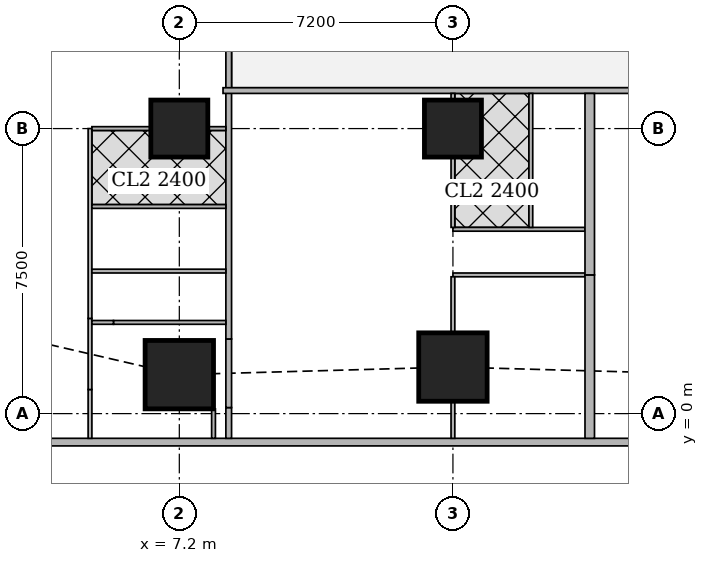
"""IFC4 building model, lengths in metres.
Left out: names, types, materials, properties, quantities, classifications, styles, units other than length and angle.
Written with IfcOpenShell. Run it as: python <this file> out.ifc"""

import sys

from ifc_helpers import new_model, si_unit, direction, frame, frame_2d, origin, origin_2d, place, context, subcontext, project, spatial, rectangle, extrude, element, fill, save


model = new_model("IFC4")
c1 = context("Model", 3, precision=1e-05, world=origin(), true_north=direction((0.0, 1.0)))
c2 = subcontext(c1, "Body", "Model", "MODEL_VIEW")
j1 = project(units=[si_unit("LENGTHUNIT", "METRE"), si_unit("PLANEANGLEUNIT", "RADIAN")], contexts=[c1])
p1 = place(None, origin())
s1 = spatial("IfcSite", under=j1, at=p1, CompositionType="ELEMENT")
p2 = place(p1, origin())
s2 = spatial("IfcBuilding", under=s1, at=p2, CompositionType="ELEMENT")
p3 = place(p2, frame((0.0, 0.0, 139.55)))
s3 = spatial("IfcBuildingStorey", under=s2, at=p3, CompositionType="ELEMENT", Elevation=139.55)
for number, where, z_axis, x_axis in (
    (1, (7.2, 1.025, 0.0), (0.0, 0.0, 1.0), (1.0, 0.0, 0.0)),
    (2, (14.4, 1.225, 0.0), (0.0, 0.0, 1.0), (1.0, 0.0, 0.0)),
):
    element("IfcColumn", number, at=place(p3, frame(where, z_axis=z_axis, x_axis=x_axis)), inside=s3, PredefinedType="COLUMN", context=c2, shape_type="SweptSolid", body=[
        extrude(rectangle(XDim=1.8, YDim=1.8, at=origin_2d()), origin(), (0.0, 0.0, 1.0), 3.75),
    ])
for number, where, z_axis, x_axis in (
    (3, (7.2, 7.5, 0.0), (0.0, 0.0, 1.0), (1.0, 0.0, 0.0)),
    (4, (14.4, 7.5, 0.0), (0.0, 0.0, 1.0), (1.0, 0.0, 0.0)),
):
    element("IfcColumn", number, at=place(p3, frame(where, z_axis=z_axis, x_axis=x_axis)), inside=s3, PredefinedType="COLUMN", context=c2, shape_type="SweptSolid", body=[
        extrude(rectangle(XDim=1.5, YDim=1.5, at=origin_2d()), origin(), (0.0, 0.0, 1.0), 3.75),
    ])
p4 = place(p3, frame((2.163, -0.75, 0.0), z_axis=(0.0, 0.0, 1.0), x_axis=(1.0, 0.0, 0.0)))
e5 = element("IfcWall", 5, at=p4, inside=s3, PredefinedType="SOLIDWALL", context=c2, shape_type="SweptSolid", body=[
    extrude(rectangle(XDim=45.628, YDim=0.2, at=frame_2d((22.814, 0.0))), origin(), (0.0, 0.0, 1.0), 3.5),
])
p5 = place(p4, frame((9.537, 0.0, 0.9)))
e6 = element("IfcOpeningElement", 6, at=p5, cuts=e5, PredefinedType="OPENING", context=c2, shape_type="SweptSolid", body=[
    extrude(rectangle(XDim=1.8, YDim=1.5, at=frame_2d((0.9, 0.75))), frame((0.0, 0.11, 0.0), z_axis=(0.0, -1.0, 0.0), x_axis=(1.0, 0.0, 0.0)), (0.0, 0.0, 1.0), 0.22),
])
p6 = place(p4, frame((13.137, 0.0, 0.9)))
e7 = element("IfcOpeningElement", 7, at=p6, cuts=e5, PredefinedType="OPENING", context=c2, shape_type="SweptSolid", body=[
    extrude(rectangle(XDim=1.8, YDim=1.5, at=frame_2d((0.9, 0.75))), frame((0.0, 0.11, 0.0), z_axis=(0.0, -1.0, 0.0), x_axis=(1.0, 0.0, 0.0)), (0.0, 0.0, 1.0), 0.22),
])
p7 = place(p4, frame((16.737, 0.0, 0.9)))
e8 = element("IfcOpeningElement", 8, at=p7, cuts=e5, PredefinedType="OPENING", context=c2, shape_type="SweptSolid", body=[
    extrude(rectangle(XDim=1.8, YDim=1.5, at=frame_2d((0.9, 0.75))), frame((0.0, 0.11, 0.0), z_axis=(0.0, -1.0, 0.0), x_axis=(1.0, 0.0, 0.0)), (0.0, 0.0, 1.0), 0.22),
])
p8 = place(p4, frame((20.337, 0.0, 0.9)))
e9 = element("IfcOpeningElement", 9, at=p8, cuts=e5, PredefinedType="OPENING", context=c2, shape_type="SweptSolid", body=[
    extrude(rectangle(XDim=1.8, YDim=1.5, at=frame_2d((0.9, 0.75))), frame((0.0, 0.11, 0.0), z_axis=(0.0, -1.0, 0.0), x_axis=(1.0, 0.0, 0.0)), (0.0, 0.0, 1.0), 0.22),
])
p9 = place(p4, frame((23.937, 0.0, 0.9)))
e10 = element("IfcOpeningElement", 10, at=p9, cuts=e5, PredefinedType="OPENING", context=c2, shape_type="SweptSolid", body=[
    extrude(rectangle(XDim=1.8, YDim=1.5, at=frame_2d((0.9, 0.75))), frame((0.0, 0.11, 0.0), z_axis=(0.0, -1.0, 0.0), x_axis=(1.0, 0.0, 0.0)), (0.0, 0.0, 1.0), 0.22),
])
p10 = place(p4, frame((27.537, 0.0, 0.9)))
e11 = element("IfcOpeningElement", 11, at=p10, cuts=e5, PredefinedType="OPENING", context=c2, shape_type="SweptSolid", body=[
    extrude(rectangle(XDim=1.8, YDim=1.5, at=frame_2d((0.9, 0.75))), frame((0.0, 0.11, 0.0), z_axis=(0.0, -1.0, 0.0), x_axis=(1.0, 0.0, 0.0)), (0.0, 0.0, 1.0), 0.22),
])
p11 = place(p4, frame((31.137, 0.0, 0.9)))
e12 = element("IfcOpeningElement", 12, at=p11, cuts=e5, PredefinedType="OPENING", context=c2, shape_type="SweptSolid", body=[
    extrude(rectangle(XDim=1.8, YDim=1.5, at=frame_2d((0.9, 0.75))), frame((0.0, 0.11, 0.0), z_axis=(0.0, -1.0, 0.0), x_axis=(1.0, 0.0, 0.0)), (0.0, 0.0, 1.0), 0.22),
])
p12 = place(p4, frame((34.737, 0.0, 0.9)))
e13 = element("IfcOpeningElement", 13, at=p12, cuts=e5, PredefinedType="OPENING", context=c2, shape_type="SweptSolid", body=[
    extrude(rectangle(XDim=1.8, YDim=1.5, at=frame_2d((0.9, 0.75))), frame((0.0, 0.11, 0.0), z_axis=(0.0, -1.0, 0.0), x_axis=(1.0, 0.0, 0.0)), (0.0, 0.0, 1.0), 0.22),
])
p13 = place(p3, frame((8.5, -0.65, 0.0), z_axis=(0.0, 0.0, 1.0), x_axis=(0.0, 1.0, 0.0)))
e14 = element("IfcWall", 14, at=p13, inside=s3, PredefinedType="SOLIDWALL", context=c2, shape_type="SweptSolid", body=[
    extrude(rectangle(XDim=0.809, YDim=0.15, at=frame_2d((0.404, 0.0))), origin(), (0.0, 0.0, 1.0), 3.5),
])
p14 = place(p3, frame((8.5, 0.159, 0.0), z_axis=(0.0, 0.0, 1.0), x_axis=(0.0, 1.0, 0.0)))
e15 = element("IfcWall", 15, at=p14, inside=s3, PredefinedType="SOLIDWALL", context=c2, shape_type="SweptSolid", body=[
    extrude(rectangle(XDim=1.805, YDim=0.15, at=frame_2d((0.903, 0.0))), origin(), (0.0, 0.0, 1.0), 2.1),
])
p15 = place(p3, frame((8.5, 1.964, 0.0), z_axis=(0.0, 0.0, 1.0), x_axis=(0.0, 1.0, 0.0)))
e16 = element("IfcWall", 16, at=p15, inside=s3, PredefinedType="SOLIDWALL", context=c2, shape_type="SweptSolid", body=[
    extrude(rectangle(XDim=41.097, YDim=0.15, at=frame_2d((20.548, 0.0))), origin(), (0.0, 0.0, 1.0), 3.5),
])
p16 = place(p15, frame((6.911, 0.0, 0.0)))
e17 = element("IfcOpeningElement", 17, at=p16, cuts=e16, PredefinedType="OPENING", context=c2, shape_type="SweptSolid", body=[
    extrude(rectangle(XDim=1.0, YDim=2.1, at=frame_2d((0.5, 1.05))), frame((0.0, 0.085, 0.0), z_axis=(0.0, -1.0, 0.0), x_axis=(1.0, 0.0, 0.0)), (0.0, 0.0, 1.0), 0.17),
])
p17 = place(p15, frame((10.661, 0.0, 0.0)))
e18 = element("IfcOpeningElement", 18, at=p17, cuts=e16, PredefinedType="OPENING", context=c2, shape_type="SweptSolid", body=[
    extrude(rectangle(XDim=1.0, YDim=2.1, at=frame_2d((0.5, 1.05))), frame((0.0, 0.085, 0.0), z_axis=(0.0, -1.0, 0.0), x_axis=(1.0, 0.0, 0.0)), (0.0, 0.0, 1.0), 0.17),
])
p18 = place(p15, frame((25.661, 0.0, 0.0)))
e19 = element("IfcOpeningElement", 19, at=p18, cuts=e16, PredefinedType="OPENING", context=c2, shape_type="SweptSolid", body=[
    extrude(rectangle(XDim=1.0, YDim=2.1, at=frame_2d((0.5, 1.05))), frame((0.0, 0.085, 0.0), z_axis=(0.0, -1.0, 0.0), x_axis=(1.0, 0.0, 0.0)), (0.0, 0.0, 1.0), 0.17),
])
p19 = place(p15, frame((33.161, 0.0, 0.0)))
e20 = element("IfcOpeningElement", 20, at=p19, cuts=e16, PredefinedType="OPENING", context=c2, shape_type="SweptSolid", body=[
    extrude(rectangle(XDim=1.0, YDim=2.1, at=frame_2d((0.5, 1.05))), frame((0.0, 0.085, 0.0), z_axis=(0.0, -1.0, 0.0), x_axis=(1.0, 0.0, 0.0)), (0.0, 0.0, 1.0), 0.17),
])
p20 = place(p3, frame((40.053, 8.5, 0.0), z_axis=(0.0, 0.0, 1.0), x_axis=(-1.0, 0.0, 0.0)))
e21 = element("IfcWall", 21, at=p20, inside=s3, PredefinedType="SOLIDWALL", context=c2, shape_type="SweptSolid", body=[
    extrude(rectangle(XDim=31.703, YDim=0.15, at=frame_2d((15.852, 0.0))), origin(), (0.0, 0.0, 1.0), 3.5),
])
p21 = place(p20, frame((28.103, 0.0, 0.0)))
e22 = element("IfcOpeningElement", 22, at=p21, cuts=e21, PredefinedType="OPENING", context=c2, shape_type="SweptSolid", body=[
    extrude(rectangle(XDim=1.0, YDim=2.1, at=frame_2d((0.5, 1.05))), frame((0.0, 0.085, 0.0), z_axis=(0.0, -1.0, 0.0), x_axis=(1.0, 0.0, 0.0)), (0.0, 0.0, 1.0), 0.17),
])
p22 = place(p20, frame((19.853, 0.0, 0.0)))
e23 = element("IfcOpeningElement", 23, at=p22, cuts=e21, PredefinedType="OPENING", context=c2, shape_type="SweptSolid", body=[
    extrude(rectangle(XDim=1.0, YDim=2.1, at=frame_2d((0.5, 1.05))), frame((0.0, 0.085, 0.0), z_axis=(0.0, -1.0, 0.0), x_axis=(1.0, 0.0, 0.0)), (0.0, 0.0, 1.0), 0.17),
])
p23 = place(p20, frame((5.514, 0.0, 0.0)))
e24 = element("IfcOpeningElement", 24, at=p23, cuts=e21, PredefinedType="OPENING", context=c2, shape_type="SweptSolid", body=[
    extrude(rectangle(XDim=1.0, YDim=2.1, at=frame_2d((0.5, 1.05))), frame((0.0, 0.085, 0.0), z_axis=(0.0, -1.0, 0.0), x_axis=(1.0, 0.0, 0.0)), (0.0, 0.0, 1.0), 0.17),
])
p24 = place(p3, frame((8.1, 0.124, 0.0), z_axis=(0.0, 0.0, 1.0), x_axis=(0.0, -1.0, 0.0)))
e25 = element("IfcWall", 25, at=p24, inside=s3, PredefinedType="PARTITIONING", context=c2, shape_type="SweptSolid", body=[
    extrude(rectangle(XDim=0.774, YDim=0.1, at=frame_2d((0.387, 0.0))), origin(), (0.0, 0.0, 1.0), 3.5),
])
p25 = place(p3, frame((4.85, -0.65, 0.0), z_axis=(0.0, 0.0, 1.0), x_axis=(0.0, 1.0, 0.0)))
e26 = element("IfcWall", 26, at=p25, inside=s3, PredefinedType="PARTITIONING", context=c2, shape_type="SweptSolid", body=[
    extrude(rectangle(XDim=1.284, YDim=0.1, at=frame_2d((0.642, 0.0))), origin(), (0.0, 0.0, 1.0), 3.5),
])
p26 = place(p25, frame((0.234, 0.0, 0.0)))
e27 = element("IfcOpeningElement", 27, at=p26, cuts=e26, PredefinedType="OPENING", context=c2, shape_type="SweptSolid", body=[
    extrude(rectangle(XDim=0.9, YDim=2.1, at=frame_2d((0.45, 1.05))), frame((0.0, 0.06, 0.0), z_axis=(0.0, -1.0, 0.0), x_axis=(1.0, 0.0, 0.0)), (0.0, 0.0, 1.0), 0.12),
])
p27 = place(p3, frame((4.85, 0.634, 0.0), z_axis=(0.0, 0.0, 1.0), x_axis=(0.0, 1.0, 0.0)))
e28 = element("IfcWall", 28, at=p27, inside=s3, PredefinedType="PARTITIONING", context=c2, shape_type="SweptSolid", body=[
    extrude(rectangle(XDim=1.871, YDim=0.1, at=frame_2d((0.936, 0.0))), origin(), (0.0, 0.0, 1.0), 2.1),
])
p28 = place(p3, frame((4.85, 2.505, 0.0), z_axis=(0.0, 0.0, 1.0), x_axis=(0.0, 1.0, 0.0)))
e29 = element("IfcWall", 29, at=p28, inside=s3, PredefinedType="PARTITIONING", context=c2, shape_type="SweptSolid", body=[
    extrude(rectangle(XDim=4.995, YDim=0.1, at=frame_2d((2.498, 0.0))), origin(), (0.0, 0.0, 1.0), 3.5),
])
p29 = place(p28, frame((3.52, 0.0, 0.0)))
e30 = element("IfcOpeningElement", 30, at=p29, cuts=e29, PredefinedType="OPENING", context=c2, shape_type="SweptSolid", body=[
    extrude(rectangle(XDim=0.9, YDim=2.1, at=frame_2d((0.45, 1.05))), frame((0.0, 0.06, 0.0), z_axis=(0.0, -1.0, 0.0), x_axis=(1.0, 0.0, 0.0)), (0.0, 0.0, 1.0), 0.12),
])
p30 = place(p28, frame((1.645, 0.0, 0.0)))
e31 = element("IfcOpeningElement", 31, at=p30, cuts=e29, PredefinedType="OPENING", context=c2, shape_type="SweptSolid", body=[
    extrude(rectangle(XDim=0.9, YDim=2.1, at=frame_2d((0.45, 1.05))), frame((0.0, 0.06, 0.0), z_axis=(0.0, -1.0, 0.0), x_axis=(1.0, 0.0, 0.0)), (0.0, 0.0, 1.0), 0.12),
])
p31 = place(p3, frame((4.9, 3.75, 0.0), z_axis=(0.0, 0.0, 1.0), x_axis=(1.0, 0.0, 0.0)))
e32 = element("IfcWall", 32, at=p31, inside=s3, PredefinedType="PARTITIONING", context=c2, shape_type="SweptSolid", body=[
    extrude(rectangle(XDim=3.525, YDim=0.1, at=frame_2d((1.763, 0.0))), origin(), (0.0, 0.0, 1.0), 3.5),
])
p32 = place(p3, frame((4.9, 7.5, 0.0), z_axis=(0.0, 0.0, 1.0), x_axis=(1.0, 0.0, 0.0)))
e33 = element("IfcWall", 33, at=p32, inside=s3, PredefinedType="PARTITIONING", context=c2, shape_type="SweptSolid", body=[
    extrude(rectangle(XDim=1.549, YDim=0.1, at=frame_2d((0.774, 0.0))), origin(), (0.0, 0.0, 1.0), 3.5),
])
p33 = place(p3, frame((7.951, 7.5, 0.0), z_axis=(0.0, 0.0, 1.0), x_axis=(1.0, 0.0, 0.0)))
e34 = element("IfcWall", 34, at=p33, inside=s3, PredefinedType="PARTITIONING", context=c2, shape_type="SweptSolid", body=[
    extrude(rectangle(XDim=0.474, YDim=0.1, at=frame_2d((0.237, 0.0))), origin(), (0.0, 0.0, 1.0), 3.5),
])
p34 = place(p3, frame((4.9, 5.45, 0.0), z_axis=(0.0, 0.0, 1.0), x_axis=(1.0, 0.0, 0.0)))
e35 = element("IfcWall", 35, at=p34, inside=s3, PredefinedType="PARTITIONING", context=c2, shape_type="SweptSolid", body=[
    extrude(rectangle(XDim=3.525, YDim=0.1, at=frame_2d((1.763, 0.0))), origin(), (0.0, 0.0, 1.0), 3.5),
])
p35 = place(p3, frame((17.875, 3.65, 0.0), z_axis=(0.0, 0.0, 1.0), x_axis=(-1.0, 0.0, 0.0)))
e36 = element("IfcWall", 36, at=p35, inside=s3, PredefinedType="PARTITIONING", context=c2, shape_type="SweptSolid", body=[
    extrude(rectangle(XDim=3.475, YDim=0.1, at=frame_2d((1.738, 0.0))), origin(), (0.0, 0.0, 1.0), 3.5),
])
p36 = place(p35, frame((2.375, 0.0, 0.0)))
e37 = element("IfcOpeningElement", 37, at=p36, cuts=e36, PredefinedType="OPENING", context=c2, shape_type="SweptSolid", body=[
    extrude(rectangle(XDim=0.9, YDim=2.1, at=frame_2d((0.45, 1.05))), frame((0.0, 0.06, 0.0), z_axis=(0.0, -1.0, 0.0), x_axis=(1.0, 0.0, 0.0)), (0.0, 0.0, 1.0), 0.12),
])
p37 = place(p3, frame((17.875, 4.85, 0.0), z_axis=(0.0, 0.0, 1.0), x_axis=(-1.0, 0.0, 0.0)))
e38 = element("IfcWall", 38, at=p37, inside=s3, PredefinedType="PARTITIONING", context=c2, shape_type="SweptSolid", body=[
    extrude(rectangle(XDim=3.475, YDim=0.1, at=frame_2d((1.738, 0.0))), origin(), (0.0, 0.0, 1.0), 3.5),
])
p38 = place(p37, frame((2.0, 0.0, 0.0)))
e39 = element("IfcOpeningElement", 39, at=p38, cuts=e38, PredefinedType="OPENING", context=c2, shape_type="SweptSolid", body=[
    extrude(rectangle(XDim=0.9, YDim=2.1, at=frame_2d((0.45, 1.05))), frame((0.0, 0.06, 0.0), z_axis=(0.0, -1.0, 0.0), x_axis=(1.0, 0.0, 0.0)), (0.0, 0.0, 1.0), 0.12),
])
p39 = place(p37, frame((0.2, 0.0, 0.0)))
e40 = element("IfcOpeningElement", 40, at=p39, cuts=e38, PredefinedType="OPENING", context=c2, shape_type="SweptSolid", body=[
    extrude(rectangle(XDim=0.9, YDim=2.1, at=frame_2d((0.45, 1.05))), frame((0.0, 0.06, 0.0), z_axis=(0.0, -1.0, 0.0), x_axis=(1.0, 0.0, 0.0)), (0.0, 0.0, 1.0), 0.12),
])
p40 = place(p3, frame((14.4, -0.65, 0.0), z_axis=(0.0, 0.0, 1.0), x_axis=(0.0, 1.0, 0.0)))
e41 = element("IfcWall", 41, at=p40, inside=s3, PredefinedType="PARTITIONING", context=c2, shape_type="SweptSolid", body=[
    extrude(rectangle(XDim=0.974, YDim=0.1, at=frame_2d((0.487, 0.0))), origin(), (0.0, 0.0, 1.0), 3.5),
])
p41 = place(p3, frame((14.4, 2.126, 0.0), z_axis=(0.0, 0.0, 1.0), x_axis=(0.0, 1.0, 0.0)))
e42 = element("IfcWall", 42, at=p41, inside=s3, PredefinedType="PARTITIONING", context=c2, shape_type="SweptSolid", body=[
    extrude(rectangle(XDim=1.474, YDim=0.1, at=frame_2d((0.737, 0.0))), origin(), (0.0, 0.0, 1.0), 3.5),
])
p42 = place(p3, frame((14.4, 4.9, 0.0), z_axis=(0.0, 0.0, 1.0), x_axis=(0.0, 1.0, 0.0)))
e43 = element("IfcWall", 43, at=p42, inside=s3, PredefinedType="PARTITIONING", context=c2, shape_type="SweptSolid", body=[
    extrude(rectangle(XDim=1.849, YDim=0.1, at=frame_2d((0.925, 0.0))), origin(), (0.0, 0.0, 1.0), 3.5),
])
p43 = place(p3, frame((14.4, 8.251, 0.0), z_axis=(0.0, 0.0, 1.0), x_axis=(0.0, 1.0, 0.0)))
e44 = element("IfcWall", 44, at=p43, inside=s3, PredefinedType="PARTITIONING", context=c2, shape_type="SweptSolid", body=[
    extrude(rectangle(XDim=0.174, YDim=0.1, at=frame_2d((0.087, 0.0))), origin(), (0.0, 0.0, 1.0), 3.5),
])
p44 = place(p3, frame((16.45, 4.9, 0.0), z_axis=(0.0, 0.0, 1.0), x_axis=(0.0, 1.0, 0.0)))
e45 = element("IfcWall", 45, at=p44, inside=s3, PredefinedType="PARTITIONING", context=c2, shape_type="SweptSolid", body=[
    extrude(rectangle(XDim=3.525, YDim=0.1, at=frame_2d((1.763, 0.0))), origin(), (0.0, 0.0, 1.0), 3.5),
])
p45 = place(p3, frame((18.0, -0.65, 0.0), z_axis=(0.0, 0.0, 1.0), x_axis=(0.0, 1.0, 0.0)))
e46 = element("IfcWall", 46, at=p45, inside=s3, PredefinedType="SOLIDWALL", context=c2, shape_type="SweptSolid", body=[
    extrude(rectangle(XDim=4.3, YDim=0.25, at=frame_2d((2.15, 0.0))), origin(), (0.0, 0.0, 1.0), 2.1),
])
p46 = place(p3, frame((18.0, 3.65, 0.0), z_axis=(0.0, 0.0, 1.0), x_axis=(0.0, 1.0, 0.0)))
e47 = element("IfcWall", 47, at=p46, inside=s3, PredefinedType="SOLIDWALL", context=c2, shape_type="SweptSolid", body=[
    extrude(rectangle(XDim=4.775, YDim=0.25, at=frame_2d((2.388, 0.0))), origin(), (0.0, 0.0, 1.0), 3.5),
])
p47 = place(p3, frame((5.467, 2.4, 0.0), z_axis=(0.0, 0.0, 1.0), x_axis=(1.0, 0.0, 0.0)))
e48 = element("IfcWall", 48, at=p47, inside=s3, PredefinedType="PARTITIONING", context=c2, shape_type="SweptSolid", body=[
    extrude(rectangle(XDim=2.958, YDim=0.1, at=frame_2d((1.479, 0.0))), origin(), (0.0, 0.0, 1.0), 3.5),
])
p48 = place(p47, frame((0.108, 0.0, 0.0)))
e49 = element("IfcOpeningElement", 49, at=p48, cuts=e48, PredefinedType="OPENING", context=c2, shape_type="SweptSolid", body=[
    extrude(rectangle(XDim=0.9, YDim=2.1, at=frame_2d((0.45, 1.05))), frame((0.0, 0.06, 0.0), z_axis=(0.0, -1.0, 0.0), x_axis=(1.0, 0.0, 0.0)), (0.0, 0.0, 1.0), 0.12),
])
p49 = place(p3, frame((5.467, 2.4, 0.0), z_axis=(0.0, 0.0, 1.0), x_axis=(-1.0, 0.0, 0.0)))
e50 = element("IfcWall", 50, at=p49, inside=s3, PredefinedType="PARTITIONING", context=c2, shape_type="SweptSolid", body=[
    extrude(rectangle(XDim=0.567, YDim=0.1, at=frame_2d((0.284, 0.0))), origin(), (0.0, 0.0, 1.0), 2.1),
])
p50 = place(p5, origin())
e51 = element("IfcWindow", 51, at=p50, inside=s3, PartitioningType="SINGLE_PANEL", PredefinedType="WINDOW", context=c2, shape_type="SweptSolid", body=[
    extrude(rectangle(XDim=1.8, YDim=1.5, at=frame_2d((0.9, 0.75))), frame((0.0, 0.03, 0.0), z_axis=(0.0, -1.0, 0.0), x_axis=(1.0, 0.0, 0.0)), (0.0, 0.0, 1.0), 0.06),
])
fill(e6, e51)
p51 = place(p6, origin())
e52 = element("IfcWindow", 52, at=p51, inside=s3, PartitioningType="SINGLE_PANEL", PredefinedType="WINDOW", context=c2, shape_type="SweptSolid", body=[
    extrude(rectangle(XDim=1.8, YDim=1.5, at=frame_2d((0.9, 0.75))), frame((0.0, 0.03, 0.0), z_axis=(0.0, -1.0, 0.0), x_axis=(1.0, 0.0, 0.0)), (0.0, 0.0, 1.0), 0.06),
])
fill(e7, e52)
p52 = place(p7, origin())
e53 = element("IfcWindow", 53, at=p52, inside=s3, PartitioningType="SINGLE_PANEL", PredefinedType="WINDOW", context=c2, shape_type="SweptSolid", body=[
    extrude(rectangle(XDim=1.8, YDim=1.5, at=frame_2d((0.9, 0.75))), frame((0.0, 0.03, 0.0), z_axis=(0.0, -1.0, 0.0), x_axis=(1.0, 0.0, 0.0)), (0.0, 0.0, 1.0), 0.06),
])
fill(e8, e53)
p53 = place(p29, origin())
e54 = element("IfcDoor", 54, at=p53, inside=s3, OperationType="SINGLE_SWING_LEFT", PredefinedType="DOOR", context=c2, shape_type="SweptSolid", body=[
    extrude(rectangle(XDim=0.9, YDim=2.1, at=frame_2d((0.45, 1.05))), frame((0.0, 0.025, 0.0), z_axis=(0.0, -1.0, 0.0), x_axis=(1.0, 0.0, 0.0)), (0.0, 0.0, 1.0), 0.05),
])
fill(e30, e54)
p54 = place(p26, origin())
e55 = element("IfcDoor", 55, at=p54, inside=s3, OperationType="SINGLE_SWING_LEFT", PredefinedType="DOOR", context=c2, shape_type="SweptSolid", body=[
    extrude(rectangle(XDim=0.9, YDim=2.1, at=frame_2d((0.45, 1.05))), frame((0.0, 0.025, 0.0), z_axis=(0.0, -1.0, 0.0), x_axis=(1.0, 0.0, 0.0)), (0.0, 0.0, 1.0), 0.05),
])
fill(e27, e55)
p55 = place(p30, origin())
e56 = element("IfcDoor", 56, at=p55, inside=s3, OperationType="SINGLE_SWING_LEFT", PredefinedType="DOOR", context=c2, shape_type="SweptSolid", body=[
    extrude(rectangle(XDim=0.9, YDim=2.1, at=frame_2d((0.45, 1.05))), frame((0.0, 0.025, 0.0), z_axis=(0.0, -1.0, 0.0), x_axis=(1.0, 0.0, 0.0)), (0.0, 0.0, 1.0), 0.05),
])
fill(e31, e56)
p56 = place(p16, origin())
e57 = element("IfcDoor", 57, at=p56, inside=s3, OperationType="SINGLE_SWING_LEFT", PredefinedType="DOOR", context=c2, shape_type="SweptSolid", body=[
    extrude(rectangle(XDim=1.0, YDim=2.1, at=frame_2d((0.5, 1.05))), frame((0.0, 0.025, 0.0), z_axis=(0.0, -1.0, 0.0), x_axis=(1.0, 0.0, 0.0)), (0.0, 0.0, 1.0), 0.05),
])
fill(e17, e57)
p57 = place(p36, origin())
e58 = element("IfcDoor", 58, at=p57, inside=s3, OperationType="SINGLE_SWING_RIGHT", PredefinedType="DOOR", context=c2, shape_type="SweptSolid", body=[
    extrude(rectangle(XDim=0.9, YDim=2.1, at=frame_2d((0.45, 1.05))), frame((0.0, 0.025, 0.0), z_axis=(0.0, -1.0, 0.0), x_axis=(1.0, 0.0, 0.0)), (0.0, 0.0, 1.0), 0.05),
])
fill(e37, e58)
p58 = place(p38, origin())
e59 = element("IfcDoor", 59, at=p58, inside=s3, OperationType="SINGLE_SWING_LEFT", PredefinedType="DOOR", context=c2, shape_type="SweptSolid", body=[
    extrude(rectangle(XDim=0.9, YDim=2.1, at=frame_2d((0.45, 1.05))), frame((0.0, 0.025, 0.0), z_axis=(0.0, -1.0, 0.0), x_axis=(1.0, 0.0, 0.0)), (0.0, 0.0, 1.0), 0.05),
])
fill(e39, e59)
p59 = place(p39, origin())
e60 = element("IfcDoor", 60, at=p59, inside=s3, OperationType="SINGLE_SWING_RIGHT", PredefinedType="DOOR", context=c2, shape_type="SweptSolid", body=[
    extrude(rectangle(XDim=0.9, YDim=2.1, at=frame_2d((0.45, 1.05))), frame((0.0, 0.025, 0.0), z_axis=(0.0, -1.0, 0.0), x_axis=(1.0, 0.0, 0.0)), (0.0, 0.0, 1.0), 0.05),
])
fill(e40, e60)
p60 = place(p21, origin())
e61 = element("IfcDoor", 61, at=p60, inside=s3, OperationType="SINGLE_SWING_RIGHT", PredefinedType="DOOR", context=c2, shape_type="SweptSolid", body=[
    extrude(rectangle(XDim=1.0, YDim=2.1, at=frame_2d((0.5, 1.05))), frame((0.0, 0.025, 0.0), z_axis=(0.0, -1.0, 0.0), x_axis=(1.0, 0.0, 0.0)), (0.0, 0.0, 1.0), 0.05),
])
fill(e22, e61)
p61 = place(p48, origin())
e62 = element("IfcDoor", 62, at=p61, inside=s3, OperationType="SINGLE_SWING_LEFT", PredefinedType="DOOR", context=c2, shape_type="SweptSolid", body=[
    extrude(rectangle(XDim=0.9, YDim=2.1, at=frame_2d((0.45, 1.05))), frame((0.0, 0.025, 0.0), z_axis=(0.0, -1.0, 0.0), x_axis=(1.0, 0.0, 0.0)), (0.0, 0.0, 1.0), 0.05),
])
fill(e49, e62)
save(model, sys.argv[1])
